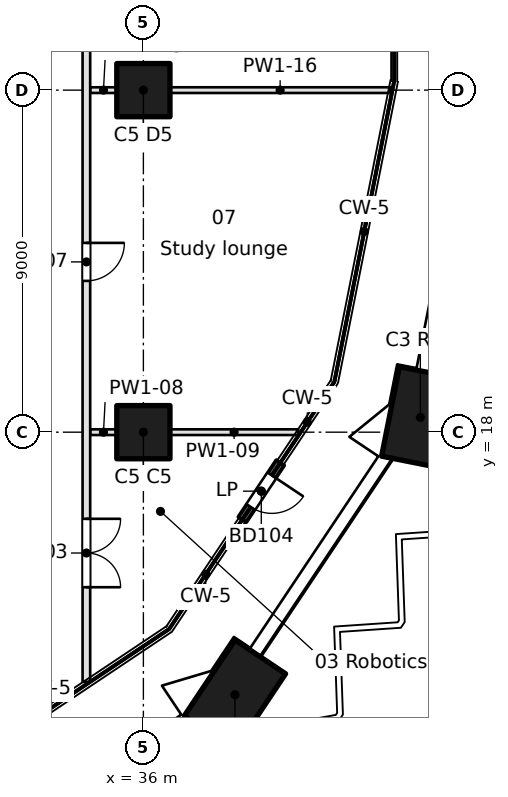
"""IFC4 building model, lengths in metres.
Left out: names, types, materials, properties, quantities, classifications, styles, units other than length and angle.
Written with IfcOpenShell. Run it as: python <this file> out.ifc"""

import sys

from ifc_helpers import new_model, si_unit, direction, frame, frame_2d, origin, origin_2d, place, context, subcontext, project, spatial, rectangle, extrude, element, fill, save


model = new_model("IFC4")
c1 = context("Model", 3, precision=1e-05, world=origin(), true_north=direction((0.0, 1.0)))
c2 = subcontext(c1, "Body", "Model", "MODEL_VIEW")
j1 = project(units=[si_unit("LENGTHUNIT", "METRE"), si_unit("PLANEANGLEUNIT", "RADIAN")], contexts=[c1])
p1 = place(None, origin())
s1 = spatial("IfcSite", under=j1, at=p1, CompositionType="ELEMENT")
p2 = place(p1, origin())
s2 = spatial("IfcBuilding", under=s1, at=p2, CompositionType="ELEMENT")
p3 = place(p2, frame((0.0, 0.0, 46.9)))
s3 = spatial("IfcBuildingStorey", under=s2, at=p3, CompositionType="ELEMENT", Elevation=46.9)
for number, where, z_axis, x_axis in (
    (1, (38.41, 11.09, 0.0), (0.0, 0.0, 1.0), (0.556, 0.831, 0.0)),
    (2, (43.287, 18.39, 0.0), (0.0, 0.0, 1.0), (0.195, 0.981, 0.0)),
):
    element("IfcColumn", number, at=place(p3, frame(where, z_axis=z_axis, x_axis=x_axis)), inside=s3, PredefinedType="COLUMN", context=c2, shape_type="SweptSolid", body=[
        extrude(rectangle(XDim=2.4, YDim=1.6, at=origin_2d()), origin(), (0.0, 0.0, 1.0), 3.7),
    ])
for number, where, z_axis, x_axis in (
    (3, (36.0, 18.0, 0.0), (0.0, 0.0, 1.0), (1.0, 0.0, 0.0)),
    (4, (36.0, 27.0, 0.0), (0.0, 0.0, 1.0), (1.0, 0.0, 0.0)),
):
    element("IfcColumn", number, at=place(p3, frame(where, z_axis=z_axis, x_axis=x_axis)), inside=s3, PredefinedType="COLUMN", context=c2, shape_type="SweptSolid", body=[
        extrude(rectangle(XDim=1.4, YDim=1.4, at=origin_2d()), origin(), (0.0, 0.0, 1.0), 3.7),
    ])
p4 = place(p3, frame((38.602, 15.7, 0.0), z_axis=(0.0, 0.0, 1.0), x_axis=(0.555576323502, 0.83146554274, 0.0)))
e5 = element("IfcWall", 5, at=p4, inside=s3, PredefinedType="SOLIDWALL", context=c2, shape_type="SweptSolid", body=[
    extrude(rectangle(XDim=1.8, YDim=0.25, at=frame_2d((0.9, 0.0))), origin(), (0.0, 0.0, 1.0), 3.3),
])
p5 = place(p4, frame((0.4, 0.0, 0.0)))
e6 = element("IfcOpeningElement", 6, at=p5, cuts=e5, PredefinedType="OPENING", context=c2, shape_type="SweptSolid", body=[
    extrude(rectangle(XDim=1.0, YDim=2.1, at=frame_2d((0.5, 1.05))), frame((0.0, 0.125, 0.0), z_axis=(0.0, -1.0, 0.0), x_axis=(1.0, 0.0, 0.0)), (0.0, 0.0, 1.0), 0.25),
])
p6 = place(p3, frame((34.6, 18.0, 0.0), z_axis=(0.0, 0.0, 1.0), x_axis=(1.0, 0.0, 0.0)))
e7 = element("IfcWall", 7, at=p6, inside=s3, PredefinedType="PARTITIONING", context=c2, shape_type="SweptSolid", body=[
    extrude(rectangle(XDim=0.7, YDim=0.15, at=frame_2d((0.35, 0.0))), origin(), (0.0, 0.0, 1.0), 3.3),
])
p7 = place(p3, frame((36.7, 18.0, 0.0), z_axis=(0.0, 0.0, 1.0), x_axis=(1.0, 0.0, 0.0)))
e8 = element("IfcWall", 8, at=p7, inside=s3, PredefinedType="PARTITIONING", context=c2, shape_type="SweptSolid", body=[
    extrude(rectangle(XDim=3.375, YDim=0.15, at=frame_2d((1.687, 0.0))), origin(), (0.0, 0.0, 1.0), 3.3),
])
p8 = place(p3, frame((34.6, 27.0, 0.0), z_axis=(0.0, 0.0, 1.0), x_axis=(1.0, 0.0, 0.0)))
e9 = element("IfcWall", 9, at=p8, inside=s3, PredefinedType="PARTITIONING", context=c2, shape_type="SweptSolid", body=[
    extrude(rectangle(XDim=0.7, YDim=0.15, at=frame_2d((0.35, 0.0))), origin(), (0.0, 0.0, 1.0), 3.3),
])
p9 = place(p3, frame((36.7, 27.0, 0.0), z_axis=(0.0, 0.0, 1.0), x_axis=(1.0, 0.0, 0.0)))
e10 = element("IfcWall", 10, at=p9, inside=s3, PredefinedType="PARTITIONING", context=c2, shape_type="SweptSolid", body=[
    extrude(rectangle(XDim=5.797, YDim=0.15, at=frame_2d((2.898, 0.0))), origin(), (0.0, 0.0, 1.0), 3.3),
])
p10 = place(p3, frame((34.5, 59.9, 0.0), z_axis=(0.0, 0.0, 1.0), x_axis=(0.0, -1.0, 0.0)))
e11 = element("IfcWall", 11, at=p10, inside=s3, PredefinedType="PARTITIONING", context=c2, shape_type="SweptSolid", body=[
    extrude(rectangle(XDim=48.47, YDim=0.2, at=frame_2d((24.235, 0.0))), origin(), (0.0, 0.0, 1.0), 3.3),
])
p11 = place(p10, frame((44.179, 0.0, 0.0)))
e12 = element("IfcOpeningElement", 12, at=p11, cuts=e11, PredefinedType="OPENING", context=c2, shape_type="SweptSolid", body=[
    extrude(rectangle(XDim=1.8, YDim=2.1, at=frame_2d((0.9, 1.05))), frame((0.0, 0.1, 0.0), z_axis=(0.0, -1.0, 0.0), x_axis=(1.0, 0.0, 0.0)), (0.0, 0.0, 1.0), 0.2),
])
p12 = place(p10, frame((36.92, 0.0, 0.0)))
e13 = element("IfcOpeningElement", 13, at=p12, cuts=e11, PredefinedType="OPENING", context=c2, shape_type="SweptSolid", body=[
    extrude(rectangle(XDim=1.0, YDim=2.1, at=frame_2d((0.5, 1.05))), frame((0.0, 0.1, 0.0), z_axis=(0.0, -1.0, 0.0), x_axis=(1.0, 0.0, 0.0)), (0.0, 0.0, 1.0), 0.2),
])
p13 = place(p10, frame((24.858, 0.0, 0.0)))
e14 = element("IfcOpeningElement", 14, at=p13, cuts=e11, PredefinedType="OPENING", context=c2, shape_type="SweptSolid", body=[
    extrude(rectangle(XDim=1.0, YDim=2.1, at=frame_2d((0.5, 1.05))), frame((0.0, 0.1, 0.0), z_axis=(0.0, -1.0, 0.0), x_axis=(1.0, 0.0, 0.0)), (0.0, 0.0, 1.0), 0.2),
])
p14 = place(p10, frame((21.858, 0.0, 0.0)))
e15 = element("IfcOpeningElement", 15, at=p14, cuts=e11, PredefinedType="OPENING", context=c2, shape_type="SweptSolid", body=[
    extrude(rectangle(XDim=1.0, YDim=2.1, at=frame_2d((0.5, 1.05))), frame((0.0, 0.1, 0.0), z_axis=(0.0, -1.0, 0.0), x_axis=(1.0, 0.0, 0.0)), (0.0, 0.0, 1.0), 0.2),
])
p15 = place(p10, frame((9.797, 0.0, 0.0)))
e16 = element("IfcOpeningElement", 16, at=p15, cuts=e11, PredefinedType="OPENING", context=c2, shape_type="SweptSolid", body=[
    extrude(rectangle(XDim=1.0, YDim=2.1, at=frame_2d((0.5, 1.05))), frame((0.0, 0.1, 0.0), z_axis=(0.0, -1.0, 0.0), x_axis=(1.0, 0.0, 0.0)), (0.0, 0.0, 1.0), 0.2),
])
p16 = place(p10, frame((7.297, 0.0, 0.0)))
e17 = element("IfcOpeningElement", 17, at=p16, cuts=e11, PredefinedType="OPENING", context=c2, shape_type="SweptSolid", body=[
    extrude(rectangle(XDim=1.0, YDim=2.1, at=frame_2d((0.5, 1.05))), frame((0.0, 0.1, 0.0), z_axis=(0.0, -1.0, 0.0), x_axis=(1.0, 0.0, 0.0)), (0.0, 0.0, 1.0), 0.2),
])
p17 = place(p10, frame((2.514, 0.0, 0.0)))
e18 = element("IfcOpeningElement", 18, at=p17, cuts=e11, PredefinedType="OPENING", context=c2, shape_type="SweptSolid", body=[
    extrude(rectangle(XDim=1.0, YDim=2.1, at=frame_2d((0.5, 1.05))), frame((0.0, 0.1, 0.0), z_axis=(0.0, -1.0, 0.0), x_axis=(1.0, 0.0, 0.0)), (0.0, 0.0, 1.0), 0.2),
])
p18 = place(p5, frame((1.0, 0.0, 0.0), z_axis=(0.0, 0.0, 1.0), x_axis=(-1.0, 0.0, 0.0)))
e19 = element("IfcDoor", 19, at=p18, inside=s3, OperationType="SINGLE_SWING_LEFT", PredefinedType="DOOR", context=c2, shape_type="SweptSolid", body=[
    extrude(rectangle(XDim=1.0, YDim=2.1, at=frame_2d((0.5, 1.05))), frame((0.0, 0.025, 0.0), z_axis=(0.0, -1.0, 0.0), x_axis=(1.0, 0.0, 0.0)), (0.0, 0.0, 1.0), 0.05),
])
fill(e6, e19)
p19 = place(p11, origin())
e20 = element("IfcDoor", 20, at=p19, inside=s3, OperationType="DOUBLE_DOOR_SINGLE_SWING", PredefinedType="DOOR", context=c2, shape_type="SweptSolid", body=[
    extrude(rectangle(XDim=1.8, YDim=2.1, at=frame_2d((0.9, 1.05))), frame((0.0, 0.025, 0.0), z_axis=(0.0, -1.0, 0.0), x_axis=(1.0, 0.0, 0.0)), (0.0, 0.0, 1.0), 0.05),
])
fill(e12, e20)
p20 = place(p12, origin())
e21 = element("IfcDoor", 21, at=p20, inside=s3, OperationType="SINGLE_SWING_LEFT", PredefinedType="DOOR", context=c2, shape_type="SweptSolid", body=[
    extrude(rectangle(XDim=1.0, YDim=2.1, at=frame_2d((0.5, 1.05))), frame((0.0, 0.025, 0.0), z_axis=(0.0, -1.0, 0.0), x_axis=(1.0, 0.0, 0.0)), (0.0, 0.0, 1.0), 0.05),
])
fill(e13, e21)
save(model, sys.argv[1])
